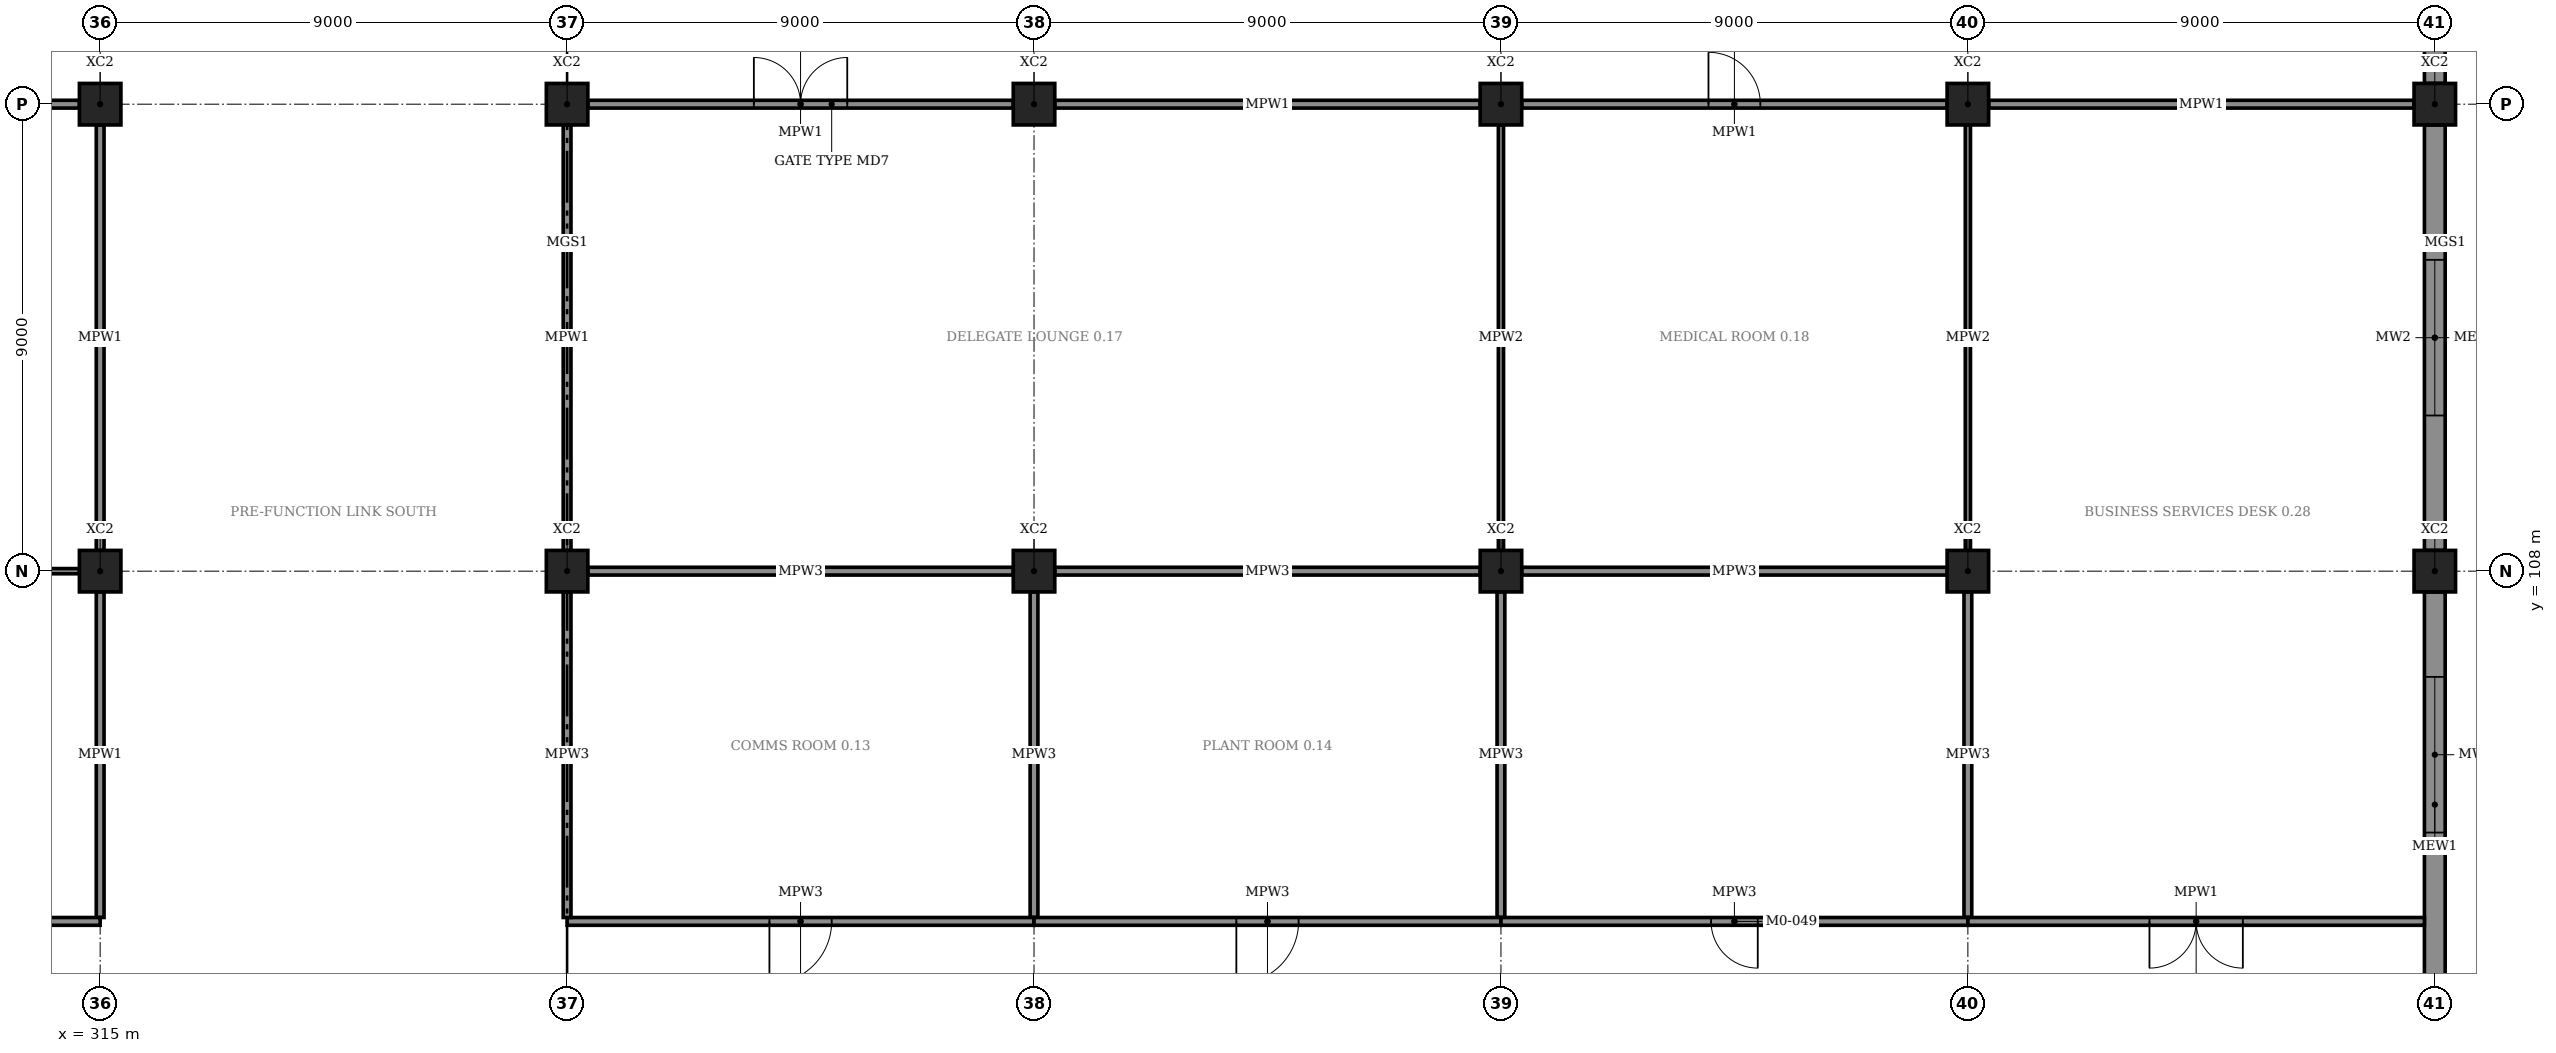
"""IFC4 building model, lengths in metres.
Left out: names, types, materials, properties, quantities, classifications, styles, units other than length and angle.
Written with IfcOpenShell. Run it as: python <this file> out.ifc"""

import sys

from ifc_helpers import new_model, si_unit, direction, frame, frame_2d, origin, origin_2d, place, context, subcontext, project, spatial, rectangle, extrude, element, fill, save


model = new_model("IFC4")
c1 = context("Model", 3, precision=1e-05, world=origin(), true_north=direction((0.0, 1.0)))
c2 = subcontext(c1, "Body", "Model", "MODEL_VIEW")
j1 = project(units=[si_unit("LENGTHUNIT", "METRE"), si_unit("PLANEANGLEUNIT", "RADIAN")], contexts=[c1])
p1 = place(None, origin())
s1 = spatial("IfcSite", under=j1, at=p1, CompositionType="ELEMENT")
p2 = place(p1, origin())
s2 = spatial("IfcBuilding", under=s1, at=p2, CompositionType="ELEMENT")
p3 = place(p2, origin())
s3 = spatial("IfcBuildingStorey", under=s2, at=p3, CompositionType="ELEMENT", Elevation=0.0)
for number, where, z_axis, x_axis in (
    (1, (315.0, 108.0, -0.3), (0.0, 0.0, 1.0), (1.0, 0.0, 0.0)),
    (2, (315.0, 117.0, -0.3), (0.0, 0.0, 1.0), (1.0, 0.0, 0.0)),
    (3, (324.0, 108.0, -0.3), (0.0, 0.0, 1.0), (1.0, 0.0, 0.0)),
    (4, (324.0, 117.0, -0.3), (0.0, 0.0, 1.0), (1.0, 0.0, 0.0)),
    (5, (333.0, 108.0, -0.3), (0.0, 0.0, 1.0), (1.0, 0.0, 0.0)),
    (6, (333.0, 117.0, -0.3), (0.0, 0.0, 1.0), (1.0, 0.0, 0.0)),
    (7, (342.0, 108.0, -0.3), (0.0, 0.0, 1.0), (1.0, 0.0, 0.0)),
    (8, (342.0, 117.0, -0.3), (0.0, 0.0, 1.0), (1.0, 0.0, 0.0)),
    (9, (351.0, 108.0, -0.3), (0.0, 0.0, 1.0), (1.0, 0.0, 0.0)),
    (10, (351.0, 117.0, -0.3), (0.0, 0.0, 1.0), (1.0, 0.0, 0.0)),
    (11, (360.0, 108.0, -0.3), (0.0, 0.0, 1.0), (1.0, 0.0, 0.0)),
    (12, (360.0, 117.0, -0.3), (0.0, 0.0, 1.0), (1.0, 0.0, 0.0)),
):
    element("IfcColumn", number, at=place(p3, frame(where, z_axis=z_axis, x_axis=x_axis)), inside=s3, PredefinedType="COLUMN", context=c2, shape_type="SweptSolid", body=[
        extrude(rectangle(XDim=0.8, YDim=0.8, at=origin_2d()), origin(), (0.0, 0.0, 1.0), 6.3),
    ])
p4 = place(p3, frame((360.0, 99.4, 0.0), z_axis=(0.0, 0.0, 1.0), x_axis=(0.0, 1.0, 0.0)))
e13 = element("IfcWall", 13, at=p4, inside=s3, PredefinedType="STANDARD", context=c2, shape_type="SweptSolid", body=[
    extrude(rectangle(XDim=8.2, YDim=0.4, at=frame_2d((4.1, 0.0))), origin(), (0.0, 0.0, 1.0), 4.82),
])
p5 = place(p4, frame((3.562, 0.0, 0.9)))
e14 = element("IfcOpeningElement", 14, at=p5, cuts=e13, PredefinedType="OPENING", context=c2, shape_type="SweptSolid", body=[
    extrude(rectangle(XDim=3.0, YDim=2.1, at=frame_2d((1.5, 1.05))), frame((0.0, 0.21, 0.0), z_axis=(0.0, -1.0, 0.0), x_axis=(1.0, 0.0, 0.0)), (0.0, 0.0, 1.0), 0.42),
])
p6 = place(p3, frame((360.0, 108.4, 0.0), z_axis=(0.0, 0.0, 1.0), x_axis=(0.0, 1.0, 0.0)))
e15 = element("IfcWall", 15, at=p6, inside=s3, PredefinedType="STANDARD", context=c2, shape_type="SweptSolid", body=[
    extrude(rectangle(XDim=8.2, YDim=0.4, at=frame_2d((4.1, 0.0))), origin(), (0.0, 0.0, 1.0), 4.82),
])
p7 = place(p6, frame((2.6, 0.0, 0.9)))
e16 = element("IfcOpeningElement", 16, at=p7, cuts=e15, PredefinedType="OPENING", context=c2, shape_type="SweptSolid", body=[
    extrude(rectangle(XDim=3.0, YDim=2.1, at=frame_2d((1.5, 1.05))), frame((0.0, 0.21, 0.0), z_axis=(0.0, -1.0, 0.0), x_axis=(1.0, 0.0, 0.0)), (0.0, 0.0, 1.0), 0.42),
])
p8 = place(p3, frame((360.0, 117.4, 0.0), z_axis=(0.0, 0.0, 1.0), x_axis=(0.0, 1.0, 0.0)))
e17 = element("IfcWall", 17, at=p8, inside=s3, PredefinedType="STANDARD", context=c2, shape_type="SweptSolid", body=[
    extrude(rectangle(XDim=8.2, YDim=0.4, at=frame_2d((4.1, 0.0))), origin(), (0.0, 0.0, 1.0), 4.82),
])
p9 = place(p8, frame((2.75, 0.0, 0.0)))
e18 = element("IfcOpeningElement", 18, at=p9, cuts=e17, PredefinedType="OPENING", context=c2, shape_type="SweptSolid", body=[
    extrude(rectangle(XDim=2.7, YDim=2.4, at=frame_2d((1.35, 1.2))), frame((0.0, 0.21, 0.0), z_axis=(0.0, -1.0, 0.0), x_axis=(1.0, 0.0, 0.0)), (0.0, 0.0, 1.0), 0.42),
])
p10 = place(p3, frame((297.0, 101.25, 0.0), z_axis=(0.0, 0.0, 1.0), x_axis=(1.0, 0.0, 0.0)))
e19 = element("IfcWall", 19, at=p10, inside=s3, PredefinedType="PARTITIONING", context=c2, shape_type="SweptSolid", body=[
    extrude(rectangle(XDim=18.0, YDim=0.15, at=frame_2d((9.0, 0.0))), origin(), (0.0, 0.0, 1.0), 4.82),
])
p11 = place(p10, frame((8.1, 0.0, 0.0)))
e20 = element("IfcOpeningElement", 20, at=p11, cuts=e19, PredefinedType="OPENING", context=c2, shape_type="SweptSolid", body=[
    extrude(rectangle(XDim=1.8, YDim=2.4, at=frame_2d((0.9, 1.2))), frame((0.0, 0.085, 0.0), z_axis=(0.0, -1.0, 0.0), x_axis=(1.0, 0.0, 0.0)), (0.0, 0.0, 1.0), 0.17),
])
p12 = place(p3, frame((306.4, 108.0, 0.0), z_axis=(0.0, 0.0, 1.0), x_axis=(1.0, 0.0, 0.0)))
e21 = element("IfcWall", 21, at=p12, inside=s3, PredefinedType="PARTITIONING", context=c2, shape_type="SweptSolid", body=[
    extrude(rectangle(XDim=8.2, YDim=0.1, at=frame_2d((4.1, 0.0))), origin(), (0.0, 0.0, 1.0), 4.82),
])
p13 = place(p3, frame((315.0, 101.325, 0.0), z_axis=(0.0, 0.0, 1.0), x_axis=(0.0, 1.0, 0.0)))
e22 = element("IfcWall", 22, at=p13, inside=s3, PredefinedType="PARTITIONING", context=c2, shape_type="SweptSolid", body=[
    extrude(rectangle(XDim=6.275, YDim=0.15, at=frame_2d((3.138, 0.0))), origin(), (0.0, 0.0, 1.0), 4.82),
])
p14 = place(p3, frame((324.0, 101.25, 0.0), z_axis=(0.0, 0.0, 1.0), x_axis=(1.0, 0.0, 0.0)))
e23 = element("IfcWall", 23, at=p14, inside=s3, PredefinedType="PARTITIONING", context=c2, shape_type="SweptSolid", body=[
    extrude(rectangle(XDim=9.0, YDim=0.15, at=frame_2d((4.5, 0.0))), origin(), (0.0, 0.0, 1.0), 4.82),
])
p15 = place(p14, frame((3.9, 0.0, 0.0)))
e24 = element("IfcOpeningElement", 24, at=p15, cuts=e23, PredefinedType="OPENING", context=c2, shape_type="SweptSolid", body=[
    extrude(rectangle(XDim=1.2, YDim=2.4, at=frame_2d((0.6, 1.2))), frame((0.0, 0.085, 0.0), z_axis=(0.0, -1.0, 0.0), x_axis=(1.0, 0.0, 0.0)), (0.0, 0.0, 1.0), 0.17),
])
p16 = place(p3, frame((324.4, 108.0, 0.0), z_axis=(0.0, 0.0, 1.0), x_axis=(1.0, 0.0, 0.0)))
e25 = element("IfcWall", 25, at=p16, inside=s3, PredefinedType="PARTITIONING", context=c2, shape_type="SweptSolid", body=[
    extrude(rectangle(XDim=8.2, YDim=0.15, at=frame_2d((4.1, 0.0))), origin(), (0.0, 0.0, 1.0), 4.82),
])
for number, where, z_axis, x_axis in (
    (26, (324.0, 101.325, 0.0), (0.0, 0.0, 1.0), (0.0, 1.0, 0.0)),
    (27, (333.0, 101.325, 0.0), (0.0, 0.0, 1.0), (0.0, 1.0, 0.0)),
):
    element("IfcWall", number, at=place(p3, frame(where, z_axis=z_axis, x_axis=x_axis)), inside=s3, PredefinedType="PARTITIONING", context=c2, shape_type="SweptSolid", body=[
        extrude(rectangle(XDim=6.275, YDim=0.15, at=frame_2d((3.138, 0.0))), origin(), (0.0, 0.0, 1.0), 4.82),
    ])
p17 = place(p3, frame((333.0, 101.25, 0.0), z_axis=(0.0, 0.0, 1.0), x_axis=(1.0, 0.0, 0.0)))
e28 = element("IfcWall", 28, at=p17, inside=s3, PredefinedType="PARTITIONING", context=c2, shape_type="SweptSolid", body=[
    extrude(rectangle(XDim=9.0, YDim=0.15, at=frame_2d((4.5, 0.0))), origin(), (0.0, 0.0, 1.0), 4.82),
])
p18 = place(p17, frame((3.9, 0.0, 0.0)))
e29 = element("IfcOpeningElement", 29, at=p18, cuts=e28, PredefinedType="OPENING", context=c2, shape_type="SweptSolid", body=[
    extrude(rectangle(XDim=1.2, YDim=2.4, at=frame_2d((0.6, 1.2))), frame((0.0, 0.085, 0.0), z_axis=(0.0, -1.0, 0.0), x_axis=(1.0, 0.0, 0.0)), (0.0, 0.0, 1.0), 0.17),
])
p19 = place(p3, frame((333.4, 108.0, 0.0), z_axis=(0.0, 0.0, 1.0), x_axis=(1.0, 0.0, 0.0)))
e30 = element("IfcWall", 30, at=p19, inside=s3, PredefinedType="PARTITIONING", context=c2, shape_type="SweptSolid", body=[
    extrude(rectangle(XDim=8.2, YDim=0.15, at=frame_2d((4.1, 0.0))), origin(), (0.0, 0.0, 1.0), 4.82),
])
p20 = place(p3, frame((342.0, 101.325, 0.0), z_axis=(0.0, 0.0, 1.0), x_axis=(0.0, 1.0, 0.0)))
e31 = element("IfcWall", 31, at=p20, inside=s3, PredefinedType="PARTITIONING", context=c2, shape_type="SweptSolid", body=[
    extrude(rectangle(XDim=6.275, YDim=0.15, at=frame_2d((3.138, 0.0))), origin(), (0.0, 0.0, 1.0), 4.82),
])
p21 = place(p3, frame((342.0, 101.25, 0.0), z_axis=(0.0, 0.0, 1.0), x_axis=(1.0, 0.0, 0.0)))
e32 = element("IfcWall", 32, at=p21, inside=s3, PredefinedType="PARTITIONING", context=c2, shape_type="SweptSolid", body=[
    extrude(rectangle(XDim=9.0, YDim=0.15, at=frame_2d((4.5, 0.0))), origin(), (0.0, 0.0, 1.0), 4.82),
])
p22 = place(p21, frame((4.05, 0.0, 0.0)))
e33 = element("IfcOpeningElement", 33, at=p22, cuts=e32, PredefinedType="OPENING", context=c2, shape_type="SweptSolid", body=[
    extrude(rectangle(XDim=0.9, YDim=2.1, at=frame_2d((0.45, 1.05))), frame((0.0, 0.085, 0.0), z_axis=(0.0, -1.0, 0.0), x_axis=(1.0, 0.0, 0.0)), (0.0, 0.0, 1.0), 0.17),
])
p23 = place(p3, frame((342.4, 108.0, 0.0), z_axis=(0.0, 0.0, 1.0), x_axis=(1.0, 0.0, 0.0)))
e34 = element("IfcWall", 34, at=p23, inside=s3, PredefinedType="PARTITIONING", context=c2, shape_type="SweptSolid", body=[
    extrude(rectangle(XDim=8.2, YDim=0.15, at=frame_2d((4.1, 0.0))), origin(), (0.0, 0.0, 1.0), 4.82),
])
p24 = place(p3, frame((351.0, 101.325, 0.0), z_axis=(0.0, 0.0, 1.0), x_axis=(0.0, 1.0, 0.0)))
e35 = element("IfcWall", 35, at=p24, inside=s3, PredefinedType="PARTITIONING", context=c2, shape_type="SweptSolid", body=[
    extrude(rectangle(XDim=6.275, YDim=0.15, at=frame_2d((3.138, 0.0))), origin(), (0.0, 0.0, 1.0), 4.82),
])
for number, where, z_axis, x_axis in (
    (36, (306.4, 117.0, 0.0), (0.0, 0.0, 1.0), (1.0, 0.0, 0.0)),
    (37, (315.0, 108.4, 0.0), (0.0, 0.0, 1.0), (0.0, 1.0, 0.0)),
):
    element("IfcWall", number, at=place(p3, frame(where, z_axis=z_axis, x_axis=x_axis)), inside=s3, PredefinedType="PARTITIONING", context=c2, shape_type="SweptSolid", body=[
        extrude(rectangle(XDim=8.2, YDim=0.15, at=frame_2d((4.1, 0.0))), origin(), (0.0, 0.0, 1.0), 4.82),
    ])
p25 = place(p3, frame((324.4, 117.0, 0.0), z_axis=(0.0, 0.0, 1.0), x_axis=(1.0, 0.0, 0.0)))
e38 = element("IfcWall", 38, at=p25, inside=s3, PredefinedType="PARTITIONING", context=c2, shape_type="SweptSolid", body=[
    extrude(rectangle(XDim=8.2, YDim=0.15, at=frame_2d((4.1, 0.0))), origin(), (0.0, 0.0, 1.0), 4.82),
])
p26 = place(p25, frame((3.2, 0.0, 0.0)))
e39 = element("IfcOpeningElement", 39, at=p26, cuts=e38, PredefinedType="OPENING", context=c2, shape_type="SweptSolid", body=[
    extrude(rectangle(XDim=1.8, YDim=2.4, at=frame_2d((0.9, 1.2))), frame((0.0, 0.085, 0.0), z_axis=(0.0, -1.0, 0.0), x_axis=(1.0, 0.0, 0.0)), (0.0, 0.0, 1.0), 0.17),
])
for number, where, z_axis, x_axis in (
    (40, (333.4, 117.0, 0.0), (0.0, 0.0, 1.0), (1.0, 0.0, 0.0)),
    (41, (324.0, 108.4, 0.0), (0.0, 0.0, 1.0), (0.0, 1.0, 0.0)),
):
    element("IfcWall", number, at=place(p3, frame(where, z_axis=z_axis, x_axis=x_axis)), inside=s3, PredefinedType="PARTITIONING", context=c2, shape_type="SweptSolid", body=[
        extrude(rectangle(XDim=8.2, YDim=0.15, at=frame_2d((4.1, 0.0))), origin(), (0.0, 0.0, 1.0), 4.82),
    ])
p27 = place(p3, frame((342.0, 108.4, 0.0), z_axis=(0.0, 0.0, 1.0), x_axis=(0.0, 1.0, 0.0)))
e42 = element("IfcWall", 42, at=p27, inside=s3, PredefinedType="PARTITIONING", context=c2, shape_type="SweptSolid", body=[
    extrude(rectangle(XDim=8.2, YDim=0.1, at=frame_2d((4.1, 0.0))), origin(), (0.0, 0.0, 1.0), 4.82),
])
p28 = place(p3, frame((342.4, 117.0, 0.0), z_axis=(0.0, 0.0, 1.0), x_axis=(1.0, 0.0, 0.0)))
e43 = element("IfcWall", 43, at=p28, inside=s3, PredefinedType="PARTITIONING", context=c2, shape_type="SweptSolid", body=[
    extrude(rectangle(XDim=8.2, YDim=0.15, at=frame_2d((4.1, 0.0))), origin(), (0.0, 0.0, 1.0), 4.82),
])
p29 = place(p28, frame((3.6, 0.0, 0.0)))
e44 = element("IfcOpeningElement", 44, at=p29, cuts=e43, PredefinedType="OPENING", context=c2, shape_type="SweptSolid", body=[
    extrude(rectangle(XDim=1.0, YDim=2.4, at=frame_2d((0.5, 1.2))), frame((0.0, 0.085, 0.0), z_axis=(0.0, -1.0, 0.0), x_axis=(1.0, 0.0, 0.0)), (0.0, 0.0, 1.0), 0.17),
])
p30 = place(p3, frame((351.0, 108.4, 0.0), z_axis=(0.0, 0.0, 1.0), x_axis=(0.0, 1.0, 0.0)))
e45 = element("IfcWall", 45, at=p30, inside=s3, PredefinedType="PARTITIONING", context=c2, shape_type="SweptSolid", body=[
    extrude(rectangle(XDim=8.2, YDim=0.1, at=frame_2d((4.1, 0.0))), origin(), (0.0, 0.0, 1.0), 4.82),
])
p31 = place(p3, frame((351.0, 101.25, 0.0), z_axis=(0.0, 0.0, 1.0), x_axis=(1.0, 0.0, 0.0)))
e46 = element("IfcWall", 46, at=p31, inside=s3, PredefinedType="PARTITIONING", context=c2, shape_type="SweptSolid", body=[
    extrude(rectangle(XDim=8.8, YDim=0.15, at=frame_2d((4.4, 0.0))), origin(), (0.0, 0.0, 1.0), 4.82),
])
p32 = place(p31, frame((3.5, 0.0, 0.0)))
e47 = element("IfcOpeningElement", 47, at=p32, cuts=e46, PredefinedType="OPENING", context=c2, shape_type="SweptSolid", body=[
    extrude(rectangle(XDim=1.8, YDim=2.4, at=frame_2d((0.9, 1.2))), frame((0.0, 0.085, 0.0), z_axis=(0.0, -1.0, 0.0), x_axis=(1.0, 0.0, 0.0)), (0.0, 0.0, 1.0), 0.17),
])
p33 = place(p3, frame((351.4, 117.0, 0.0), z_axis=(0.0, 0.0, 1.0), x_axis=(1.0, 0.0, 0.0)))
e48 = element("IfcWall", 48, at=p33, inside=s3, PredefinedType="PARTITIONING", context=c2, shape_type="SweptSolid", body=[
    extrude(rectangle(XDim=8.2, YDim=0.15, at=frame_2d((4.1, 0.0))), origin(), (0.0, 0.0, 1.0), 4.82),
])
p34 = place(p5, origin())
e49 = element("IfcWindow", 49, at=p34, inside=s3, PartitioningType="TRIPLE_PANEL_VERTICAL", PredefinedType="WINDOW", context=c2, shape_type="SweptSolid", body=[
    extrude(rectangle(XDim=3.0, YDim=2.1, at=frame_2d((1.5, 1.05))), frame((0.0, 0.03, 0.0), z_axis=(0.0, -1.0, 0.0), x_axis=(1.0, 0.0, 0.0)), (0.0, 0.0, 1.0), 0.06),
])
fill(e14, e49)
p35 = place(p7, origin())
e50 = element("IfcWindow", 50, at=p35, inside=s3, PartitioningType="TRIPLE_PANEL_VERTICAL", PredefinedType="WINDOW", context=c2, shape_type="SweptSolid", body=[
    extrude(rectangle(XDim=3.0, YDim=2.1, at=frame_2d((1.5, 1.05))), frame((0.0, 0.03, 0.0), z_axis=(0.0, -1.0, 0.0), x_axis=(1.0, 0.0, 0.0)), (0.0, 0.0, 1.0), 0.06),
])
fill(e16, e50)
p36 = place(p15, frame((1.2, 0.0, 0.0), z_axis=(0.0, 0.0, 1.0), x_axis=(-1.0, 0.0, 0.0)))
e51 = element("IfcDoor", 51, at=p36, inside=s3, OperationType="SINGLE_SWING_LEFT", PredefinedType="DOOR", context=c2, shape_type="SweptSolid", body=[
    extrude(rectangle(XDim=1.2, YDim=2.4, at=frame_2d((0.6, 1.2))), frame((0.0, 0.025, 0.0), z_axis=(0.0, -1.0, 0.0), x_axis=(1.0, 0.0, 0.0)), (0.0, 0.0, 1.0), 0.05),
])
fill(e24, e51)
p37 = place(p18, frame((1.2, 0.0, 0.0), z_axis=(0.0, 0.0, 1.0), x_axis=(-1.0, 0.0, 0.0)))
e52 = element("IfcDoor", 52, at=p37, inside=s3, OperationType="SINGLE_SWING_LEFT", PredefinedType="DOOR", context=c2, shape_type="SweptSolid", body=[
    extrude(rectangle(XDim=1.2, YDim=2.4, at=frame_2d((0.6, 1.2))), frame((0.0, 0.025, 0.0), z_axis=(0.0, -1.0, 0.0), x_axis=(1.0, 0.0, 0.0)), (0.0, 0.0, 1.0), 0.05),
])
fill(e29, e52)
p38 = place(p22, frame((0.9, 0.0, 0.0), z_axis=(0.0, 0.0, 1.0), x_axis=(-1.0, 0.0, 0.0)))
e53 = element("IfcDoor", 53, at=p38, inside=s3, OperationType="SINGLE_SWING_RIGHT", PredefinedType="DOOR", context=c2, shape_type="SweptSolid", body=[
    extrude(rectangle(XDim=0.9, YDim=2.1, at=frame_2d((0.45, 1.05))), frame((0.0, 0.025, 0.0), z_axis=(0.0, -1.0, 0.0), x_axis=(1.0, 0.0, 0.0)), (0.0, 0.0, 1.0), 0.05),
])
fill(e33, e53)
p39 = place(p26, origin())
e54 = element("IfcDoor", 54, at=p39, inside=s3, OperationType="DOUBLE_DOOR_SINGLE_SWING", PredefinedType="DOOR", context=c2, shape_type="SweptSolid", body=[
    extrude(rectangle(XDim=1.8, YDim=2.4, at=frame_2d((0.9, 1.2))), frame((0.0, 0.025, 0.0), z_axis=(0.0, -1.0, 0.0), x_axis=(1.0, 0.0, 0.0)), (0.0, 0.0, 1.0), 0.05),
])
fill(e39, e54)
p40 = place(p29, origin())
e55 = element("IfcDoor", 55, at=p40, inside=s3, OperationType="SINGLE_SWING_LEFT", PredefinedType="DOOR", context=c2, shape_type="SweptSolid", body=[
    extrude(rectangle(XDim=1.0, YDim=2.4, at=frame_2d((0.5, 1.2))), frame((0.0, 0.025, 0.0), z_axis=(0.0, -1.0, 0.0), x_axis=(1.0, 0.0, 0.0)), (0.0, 0.0, 1.0), 0.05),
])
fill(e44, e55)
p41 = place(p32, frame((1.8, 0.0, 0.0), z_axis=(0.0, 0.0, 1.0), x_axis=(-1.0, 0.0, 0.0)))
e56 = element("IfcDoor", 56, at=p41, inside=s3, OperationType="DOUBLE_DOOR_SINGLE_SWING", PredefinedType="DOOR", context=c2, shape_type="SweptSolid", body=[
    extrude(rectangle(XDim=1.8, YDim=2.4, at=frame_2d((0.9, 1.2))), frame((0.0, 0.025, 0.0), z_axis=(0.0, -1.0, 0.0), x_axis=(1.0, 0.0, 0.0)), (0.0, 0.0, 1.0), 0.05),
])
fill(e47, e56)
save(model, sys.argv[1])
